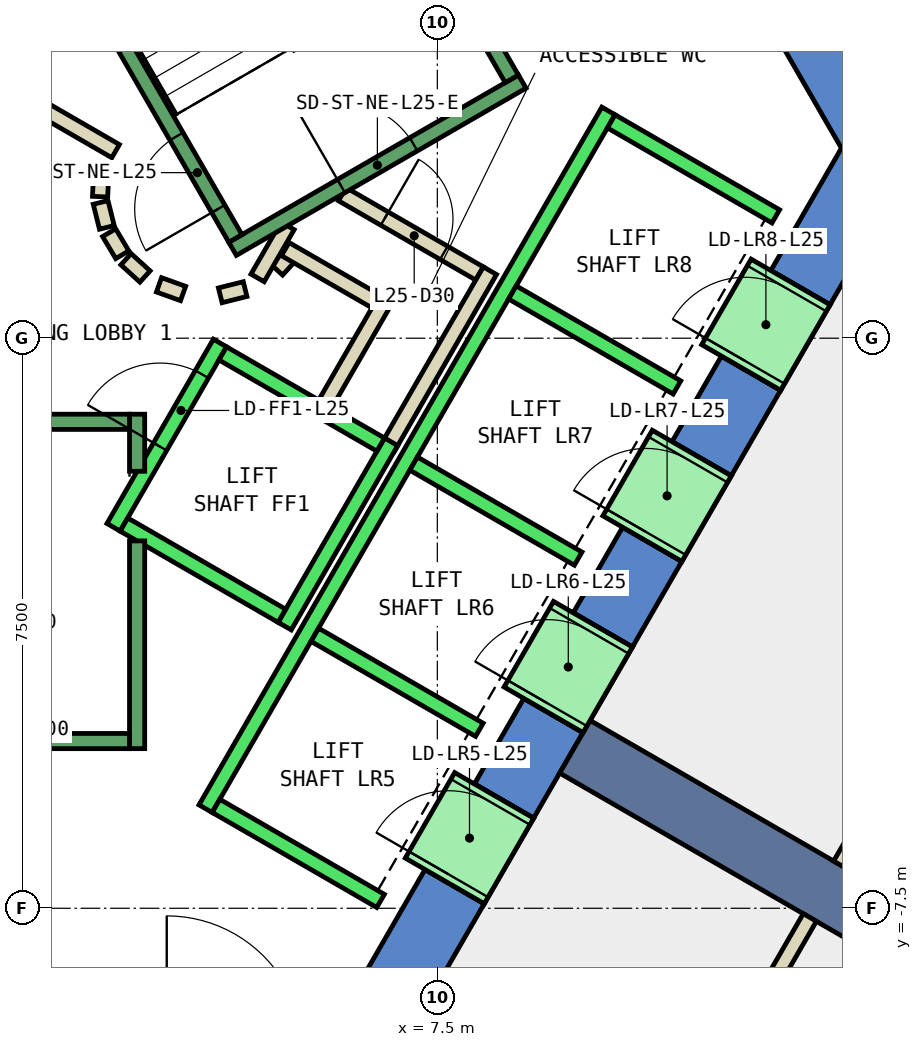
"""IFC4 building model, lengths in metres.
Left out: names, types, materials, properties, quantities, classifications, styles, units other than length and angle.
Written with IfcOpenShell. Run it as: python <this file> out.ifc"""

import sys

from ifc_helpers import new_model, si_unit, direction, frame, frame_2d, origin, place, context, subcontext, project, spatial, polyline, rectangle, outline, extrude, element, fill, save


model = new_model("IFC4")
c1 = context("Model", 3, precision=1e-05, world=origin(), true_north=direction((0.0, 1.0)))
c2 = subcontext(c1, "Body", "Model", "MODEL_VIEW")
j1 = project(units=[si_unit("LENGTHUNIT", "METRE"), si_unit("PLANEANGLEUNIT", "RADIAN")], contexts=[c1])
p1 = place(None, origin())
s1 = spatial("IfcSite", under=j1, at=p1, CompositionType="ELEMENT")
p2 = place(p1, origin())
s2 = spatial("IfcBuilding", under=s1, at=p2, CompositionType="ELEMENT")
p3 = place(p2, frame((0.0, 0.0, 116.0)))
s3 = spatial("IfcBuildingStorey", under=s2, at=p3, CompositionType="ELEMENT", Elevation=116.0)
p4 = place(p3, frame((0.0, 0.0, -0.4)))
e1 = element("IfcWall", 1, at=p4, inside=s3, PredefinedType="SHEAR", context=c2, shape_type="SweptSolid", body=[
    extrude(outline(polyline([(8.517, 11.748), (7.738, 11.298), (12.817, 2.5), (13.856, 2.5), (8.517, 11.748)])), origin(), (0.0, 0.0, 1.0), 4.2),
])
p5 = place(p3, frame((0.0, 0.0, -0.4)))
e2 = element("IfcWall", 2, at=p5, inside=s3, PredefinedType="SHEAR", context=c2, shape_type="SweptSolid", body=[
    extrude(outline(polyline([(8.117, -7.44), (7.338, -6.99), (6.409, -8.6), (6.928, -9.5), (8.117, -7.44)])), origin(), (0.0, 0.0, 1.0), 4.2),
])
p6 = place(p3, frame((0.0, 0.0, -0.4)))
e3 = element("IfcWall", 3, at=p6, inside=s3, PredefinedType="SHEAR", context=c2, shape_type="SweptSolid", body=[
    extrude(outline(polyline([(9.417, -5.189), (8.638, -4.739), (7.988, -5.864), (8.767, -6.314), (9.417, -5.189)])), origin(), (0.0, 0.0, 1.0), 4.2),
])
p7 = place(p3, frame((0.0, 0.0, -0.4)))
e4 = element("IfcWall", 4, at=p7, inside=s3, PredefinedType="SHEAR", context=c2, shape_type="SweptSolid", body=[
    extrude(outline(polyline([(10.717, -2.937), (9.938, -2.487), (9.288, -3.613), (10.067, -4.063), (10.717, -2.937)])), origin(), (0.0, 0.0, 1.0), 4.2),
])
p8 = place(p3, frame((0.0, 0.0, -0.4)))
e5 = element("IfcWall", 5, at=p8, inside=s3, PredefinedType="SHEAR", context=c2, shape_type="SweptSolid", body=[
    extrude(outline(polyline([(12.017, -0.686), (11.238, -0.236), (10.588, -1.361), (11.367, -1.811), (12.017, -0.686)])), origin(), (0.0, 0.0, 1.0), 4.2),
])
p9 = place(p3, frame((0.0, 0.0, -0.4)))
e6 = element("IfcWall", 6, at=p9, inside=s3, PredefinedType="SHEAR", context=c2, shape_type="SweptSolid", body=[
    extrude(outline(polyline([(11.888, 0.89), (12.667, 0.44), (13.856, 2.5), (12.817, 2.5), (11.888, 0.89)])), origin(), (0.0, 0.0, 1.0), 4.2),
])
p10 = place(p3, frame((0.0, 0.0, 3.6)))
e7 = element("IfcWall", 7, at=p10, inside=s3, PredefinedType="SHEAR", context=c2, shape_type="SweptSolid", body=[
    extrude(outline(polyline([(8.767, -6.314), (7.988, -5.864), (7.338, -6.99), (8.117, -7.44), (8.767, -6.314)])), origin(), (0.0, 0.0, 1.0), 0.2),
])
p11 = place(p3, frame((0.0, 0.0, 3.6)))
e8 = element("IfcWall", 8, at=p11, inside=s3, PredefinedType="SHEAR", context=c2, shape_type="SweptSolid", body=[
    extrude(outline(polyline([(10.067, -4.063), (9.288, -3.613), (8.638, -4.739), (9.417, -5.189), (10.067, -4.063)])), origin(), (0.0, 0.0, 1.0), 0.2),
])
p12 = place(p3, frame((0.0, 0.0, 3.6)))
e9 = element("IfcWall", 9, at=p12, inside=s3, PredefinedType="SHEAR", context=c2, shape_type="SweptSolid", body=[
    extrude(outline(polyline([(11.367, -1.811), (10.588, -1.361), (9.938, -2.487), (10.717, -2.937), (11.367, -1.811)])), origin(), (0.0, 0.0, 1.0), 0.2),
])
p13 = place(p3, frame((0.0, 0.0, 3.6)))
e10 = element("IfcWall", 10, at=p13, inside=s3, PredefinedType="SHEAR", context=c2, shape_type="SweptSolid", body=[
    extrude(outline(polyline([(12.667, 0.44), (11.888, 0.89), (11.238, -0.236), (12.017, -0.686), (12.667, 0.44)])), origin(), (0.0, 0.0, 1.0), 0.2),
])
p14 = place(p3, frame((9.31, -5.375, -0.4), z_axis=(0.0, 0.0, 1.0), x_axis=(0.866017533419, -0.500013631625, 0.0)))
e11 = element("IfcWall", 11, at=p14, inside=s3, PredefinedType="SHEAR", context=c2, shape_type="SweptSolid", body=[
    extrude(rectangle(XDim=9.0, YDim=0.8, at=frame_2d((4.5, 0.0))), origin(), (0.0, 0.0, 1.0), 4.2),
])
p15 = place(p3, frame((5.39, 0.898, 0.0), z_axis=(0.0, 0.0, 1.0), x_axis=(0.673828488714, 0.738887791073, 0.0)))
e12 = element("IfcWall", 12, at=p15, inside=s3, PredefinedType="PARTITIONING", context=c2, shape_type="SweptSolid", body=[
    extrude(rectangle(XDim=0.263, YDim=0.2, at=frame_2d((0.131, 0.0))), origin(), (0.0, 0.0, 1.0), 3.8),
])
p16 = place(p3, frame((5.499, 1.172, 0.0), z_axis=(0.0, 0.0, 1.0), x_axis=(0.866333505267, -0.499465972466, 0.0)))
e13 = element("IfcWall", 13, at=p16, inside=s3, PredefinedType="PARTITIONING", context=c2, shape_type="SweptSolid", body=[
    extrude(rectangle(XDim=1.374, YDim=0.2, at=frame_2d((0.687, 0.0))), origin(), (0.0, 0.0, 1.0), 3.8),
])
p17 = place(p3, frame((6.826, 0.522, 0.0), z_axis=(0.0, 0.0, 1.0), x_axis=(-0.500016722714, -0.866015748706, 0.0)))
e14 = element("IfcWall", 14, at=p17, inside=s3, PredefinedType="PARTITIONING", context=c2, shape_type="SweptSolid", body=[
    extrude(rectangle(XDim=1.7, YDim=0.2, at=frame_2d((0.85, 0.0))), origin(), (0.0, 0.0, 1.0), 3.8),
])
p18 = place(p3, frame((6.25, 1.894, 0.0), z_axis=(0.0, 0.0, 1.0), x_axis=(0.866043184279, -0.499969202016, 0.0)))
e15 = element("IfcWall", 15, at=p18, inside=s3, PredefinedType="PARTITIONING", context=c2, shape_type="SweptSolid", body=[
    extrude(rectangle(XDim=2.084, YDim=0.2, at=frame_2d((1.042, 0.0))), origin(), (0.0, 0.0, 1.0), 3.8),
])
p19 = place(p18, frame((0.642, 0.0, 0.0)))
e16 = element("IfcOpeningElement", 16, at=p19, cuts=e15, PredefinedType="OPENING", context=c2, shape_type="SweptSolid", body=[
    extrude(rectangle(XDim=0.9, YDim=2.1, at=frame_2d((0.45, 1.05))), frame((0.0, 0.11, 0.0), z_axis=(0.0, -1.0, 0.0), x_axis=(1.0, 0.0, 0.0)), (0.0, 0.0, 1.0), 0.22),
])
p20 = place(p3, frame((8.192, 0.888, 0.0), z_axis=(0.0, 0.0, 1.0), x_axis=(-0.499940625693, -0.866059680843, 0.0)))
e17 = element("IfcWall", 17, at=p20, inside=s3, PredefinedType="PARTITIONING", context=c2, shape_type="SweptSolid", body=[
    extrude(rectangle(XDim=2.68, YDim=0.2, at=frame_2d((1.34, 0.0))), origin(), (0.0, 0.0, 1.0), 3.8),
])
p21 = place(p3, frame((5.135, 0.793, 0.0), z_axis=(0.0, 0.0, 1.0), x_axis=(0.499526442893, 0.866298639529, 0.0)))
e18 = element("IfcWall", 18, at=p21, inside=s3, PredefinedType="PARTITIONING", context=c2, shape_type="SweptSolid", body=[
    extrude(rectangle(XDim=0.791, YDim=0.2, at=frame_2d((0.396, 0.0))), origin(), (0.0, 0.0, 1.0), 3.8),
])
p22 = place(p3, frame((2.012, 3.186, 0.0), z_axis=(0.0, 0.0, 1.0), x_axis=(0.865891012941, -0.500232699559, 0.0)))
e19 = element("IfcWall", 19, at=p22, inside=s3, PredefinedType="PARTITIONING", context=c2, shape_type="SweptSolid", body=[
    extrude(rectangle(XDim=1.449, YDim=0.2, at=frame_2d((0.725, 0.0))), origin(), (0.0, 0.0, 1.0), 3.8),
])
p23 = place(p3, frame((3.079, 2.199, 0.0), z_axis=(0.0, 0.0, 1.0), x_axis=(-0.047771483479, -0.998858290933, 0.0)))
e20 = element("IfcWall", 20, at=p23, inside=s3, PredefinedType="PARTITIONING", context=c2, shape_type="SweptSolid", body=[
    extrude(rectangle(XDim=0.337, YDim=0.2, at=frame_2d((0.169, 0.0))), origin(), (0.0, 0.0, 1.0), 3.8),
])
p24 = place(p3, frame((3.07, 1.786, 0.0), z_axis=(0.0, 0.0, 1.0), x_axis=(0.242705583207, -0.970099994784, 0.0)))
e21 = element("IfcWall", 21, at=p24, inside=s3, PredefinedType="PARTITIONING", context=c2, shape_type="SweptSolid", body=[
    extrude(rectangle(XDim=0.338, YDim=0.2, at=frame_2d((0.169, 0.0))), origin(), (0.0, 0.0, 1.0), 3.8),
])
for number, where, z_axis, x_axis in (
    (22, (3.182, 1.388, 0.0), (0.0, 0.0, 1.0), (0.512, -0.859, 0.0)),
    (23, (3.404, 1.039, 0.0), (0.0, 0.0, 1.0), (0.74, -0.672, 0.0)),
):
    element("IfcWall", number, at=place(p3, frame(where, z_axis=z_axis, x_axis=x_axis)), inside=s3, PredefinedType="PARTITIONING", context=c2, shape_type="SweptSolid", body=[
        extrude(rectangle(XDim=0.338, YDim=0.2, at=frame_2d((0.169, 0.0))), origin(), (0.0, 0.0, 1.0), 3.8),
    ])
p25 = place(p3, frame((3.838, 0.702, 0.0), z_axis=(0.0, 0.0, 1.0), x_axis=(0.941035081519, -0.338308993895, 0.0)))
e24 = element("IfcWall", 24, at=p25, inside=s3, PredefinedType="PARTITIONING", context=c2, shape_type="SweptSolid", body=[
    extrude(rectangle(XDim=0.337, YDim=0.2, at=frame_2d((0.168, 0.0))), origin(), (0.0, 0.0, 1.0), 3.8),
])
p26 = place(p3, frame((4.644, 0.564, 0.0), z_axis=(0.0, 0.0, 1.0), x_axis=(0.969929076366, 0.243387729394, 0.0)))
e25 = element("IfcWall", 25, at=p26, inside=s3, PredefinedType="PARTITIONING", context=c2, shape_type="SweptSolid", body=[
    extrude(rectangle(XDim=0.337, YDim=0.2, at=frame_2d((0.168, 0.0))), origin(), (0.0, 0.0, 1.0), 3.8),
])
p27 = place(p3, frame((18.301, 2.598, 0.0), z_axis=(0.0, 0.0, 1.0), x_axis=(-0.49997732567, -0.866038494419, 0.0)))
e26 = element("IfcWall", 26, at=p27, inside=s3, PredefinedType="PARTITIONING", context=c2, shape_type="SweptSolid", body=[
    extrude(rectangle(XDim=11.0, YDim=0.2, at=frame_2d((5.5, 0.0))), origin(), (0.0, 0.0, 1.0), 3.8),
])
p28 = place(p3, frame((12.401, -7.621, 0.0), z_axis=(0.0, 0.0, 1.0), x_axis=(-0.499983724212, -0.866034800411, 0.0)))
e27 = element("IfcWall", 27, at=p28, inside=s3, PredefinedType="PARTITIONING", context=c2, shape_type="SweptSolid", body=[
    extrude(rectangle(XDim=9.302, YDim=0.2, at=frame_2d((4.651, 0.0))), origin(), (0.0, 0.0, 1.0), 3.8),
])
p29 = place(p3, frame((3.24, -2.488, 0.0), z_axis=(0.0, 0.0, 1.0), x_axis=(0.49994636267, 0.866056369097, 0.0)))
e28 = element("IfcWall", 28, at=p29, inside=s3, PredefinedType="STANDARD", context=c2, shape_type="SweptSolid", body=[
    extrude(rectangle(XDim=2.8, YDim=0.2, at=frame_2d((1.4, 0.0))), origin(), (0.0, 0.0, 1.0), 3.8),
])
p30 = place(p29, frame((1.225, 0.0, 0.0)))
e29 = element("IfcOpeningElement", 29, at=p30, cuts=e28, PredefinedType="OPENING", context=c2, shape_type="SweptSolid", body=[
    extrude(rectangle(XDim=1.1, YDim=2.1, at=frame_2d((0.55, 1.05))), frame((0.0, 0.11, 0.0), z_axis=(0.0, -1.0, 0.0), x_axis=(1.0, 0.0, 0.0)), (0.0, 0.0, 1.0), 0.22),
])
p31 = place(p3, frame((5.492, -3.788, 0.0), z_axis=(0.0, 0.0, 1.0), x_axis=(0.500011755427, 0.866018616679, 0.0)))
e30 = element("IfcWall", 30, at=p31, inside=s3, PredefinedType="STANDARD", context=c2, shape_type="SweptSolid", body=[
    extrude(rectangle(XDim=2.8, YDim=0.2, at=frame_2d((1.4, 0.0))), origin(), (0.0, 0.0, 1.0), 3.8),
])
p32 = place(p3, frame((3.377, -2.452, 0.0), z_axis=(0.0, 0.0, 1.0), x_axis=(0.865955154139, -0.50012165622, 0.0)))
e31 = element("IfcWall", 31, at=p32, inside=s3, PredefinedType="STANDARD", context=c2, shape_type="SweptSolid", body=[
    extrude(rectangle(XDim=2.4, YDim=0.2, at=frame_2d((1.2, 0.0))), origin(), (0.0, 0.0, 1.0), 3.8),
])
p33 = place(p3, frame((4.677, -0.2, 0.0), z_axis=(0.0, 0.0, 1.0), x_axis=(0.865973769406, -0.500089422704, 0.0)))
e32 = element("IfcWall", 32, at=p33, inside=s3, PredefinedType="STANDARD", context=c2, shape_type="SweptSolid", body=[
    extrude(rectangle(XDim=2.399, YDim=0.2, at=frame_2d((1.2, 0.0))), origin(), (0.0, 0.0, 1.0), 3.8),
])
p34 = place(p3, frame((4.451, -6.19, 0.0), z_axis=(0.0, 0.0, 1.0), x_axis=(0.50000090737, 0.866024879913, 0.0)))
e33 = element("IfcWall", 33, at=p34, inside=s3, PredefinedType="STANDARD", context=c2, shape_type="SweptSolid", body=[
    extrude(rectangle(XDim=10.6, YDim=0.2, at=frame_2d((5.3, 0.0))), origin(), (0.0, 0.0, 1.0), 3.8),
])
for number, where, z_axis, x_axis in (
    (34, (4.588, -6.153, 0.0), (0.0, 0.0, 1.0), (0.866, -0.5, 0.0)),
    (35, (5.888, -3.902, 0.0), (0.0, 0.0, 1.0), (0.866, -0.5, 0.0)),
    (36, (7.188, -1.65, 0.0), (0.0, 0.0, 1.0), (0.866, -0.5, 0.0)),
    (37, (8.488, 0.602, 0.0), (0.0, 0.0, 1.0), (0.866, -0.5, 0.0)),
):
    element("IfcWall", number, at=place(p3, frame(where, z_axis=z_axis, x_axis=x_axis)), inside=s3, PredefinedType="STANDARD", context=c2, shape_type="SweptSolid", body=[
        extrude(rectangle(XDim=2.5, YDim=0.2, at=frame_2d((1.25, 0.0))), origin(), (0.0, 0.0, 1.0), 3.8),
    ])
p35 = place(p3, frame((9.788, 2.853, 0.0), z_axis=(0.0, 0.0, 1.0), x_axis=(0.865998541277, -0.500046524342, 0.0)))
e38 = element("IfcWall", 38, at=p35, inside=s3, PredefinedType="STANDARD", context=c2, shape_type="SweptSolid", body=[
    extrude(rectangle(XDim=2.5, YDim=0.2, at=frame_2d((1.25, 0.0))), origin(), (0.0, 0.0, 1.0), 3.8),
])
p36 = place(p3, frame((7.598, -7.14, 0.0), z_axis=(0.0, 0.0, 1.0), x_axis=(0.500362116554, 0.865816234728, 0.0)))
e39 = element("IfcWall", 39, at=p36, inside=s3, PredefinedType="STANDARD", context=c2, shape_type="SweptSolid", body=[
    extrude(rectangle(XDim=1.299, YDim=1.2, at=frame_2d((0.65, 0.0))), origin(), (0.0, 0.0, 1.0), 2.4),
])
p37 = place(p36, frame((0.1, 0.0, 0.0)))
e40 = element("IfcOpeningElement", 40, at=p37, cuts=e39, PredefinedType="OPENING", context=c2, shape_type="SweptSolid", body=[
    extrude(rectangle(XDim=1.1, YDim=2.3, at=frame_2d((0.55, 1.15))), frame((0.0, 0.61, 0.0), z_axis=(0.0, -1.0, 0.0), x_axis=(1.0, 0.0, 0.0)), (0.0, 0.0, 1.0), 1.22),
])
p38 = place(p3, frame((8.898, -4.889, 0.0), z_axis=(0.0, 0.0, 1.0), x_axis=(0.500036693733, 0.866004217611, 0.0)))
e41 = element("IfcWall", 41, at=p38, inside=s3, PredefinedType="STANDARD", context=c2, shape_type="SweptSolid", body=[
    extrude(rectangle(XDim=1.3, YDim=1.2, at=frame_2d((0.65, 0.0))), origin(), (0.0, 0.0, 1.0), 2.4),
])
p39 = place(p38, frame((0.1, 0.0, 0.0)))
e42 = element("IfcOpeningElement", 42, at=p39, cuts=e41, PredefinedType="OPENING", context=c2, shape_type="SweptSolid", body=[
    extrude(rectangle(XDim=1.1, YDim=2.3, at=frame_2d((0.55, 1.15))), frame((0.0, 0.61, 0.0), z_axis=(0.0, -1.0, 0.0), x_axis=(1.0, 0.0, 0.0)), (0.0, 0.0, 1.0), 1.22),
])
p40 = place(p3, frame((10.198, -2.637, 0.0), z_axis=(0.0, 0.0, 1.0), x_axis=(0.49989585183, 0.866085525409, 0.0)))
e43 = element("IfcWall", 43, at=p40, inside=s3, PredefinedType="STANDARD", context=c2, shape_type="SweptSolid", body=[
    extrude(rectangle(XDim=1.3, YDim=1.2, at=frame_2d((0.65, 0.0))), origin(), (0.0, 0.0, 1.0), 2.4),
])
p41 = place(p40, frame((0.1, 0.0, 0.0)))
e44 = element("IfcOpeningElement", 44, at=p41, cuts=e43, PredefinedType="OPENING", context=c2, shape_type="SweptSolid", body=[
    extrude(rectangle(XDim=1.1, YDim=2.3, at=frame_2d((0.55, 1.15))), frame((0.0, 0.61, 0.0), z_axis=(0.0, -1.0, 0.0), x_axis=(1.0, 0.0, 0.0)), (0.0, 0.0, 1.0), 1.22),
])
p42 = place(p3, frame((11.498, -0.385, 0.0), z_axis=(0.0, 0.0, 1.0), x_axis=(0.500221244143, 0.865897630733, 0.0)))
e45 = element("IfcWall", 45, at=p42, inside=s3, PredefinedType="STANDARD", context=c2, shape_type="SweptSolid", body=[
    extrude(rectangle(XDim=1.299, YDim=1.2, at=frame_2d((0.65, 0.0))), origin(), (0.0, 0.0, 1.0), 2.4),
])
p43 = place(p42, frame((0.1, 0.0, 0.0)))
e46 = element("IfcOpeningElement", 46, at=p43, cuts=e45, PredefinedType="OPENING", context=c2, shape_type="SweptSolid", body=[
    extrude(rectangle(XDim=1.1, YDim=2.3, at=frame_2d((0.55, 1.15))), frame((0.0, 0.61, 0.0), z_axis=(0.0, -1.0, 0.0), x_axis=(1.0, 0.0, 0.0)), (0.0, 0.0, 1.0), 1.22),
])
p44 = place(p3, frame((3.55, -2.667, 0.0), z_axis=(0.0, 0.0, 1.0), x_axis=(0.0, -1.0, 0.0)))
e47 = element("IfcWall", 47, at=p44, inside=s3, PredefinedType="STANDARD", context=c2, shape_type="SweptSolid", body=[
    extrude(rectangle(XDim=2.733, YDim=0.2, at=frame_2d((1.366, 0.0))), origin(), (0.0, 0.0, 1.0), 3.8),
])
p45 = place(p3, frame((3.55, -1.0, 0.0), z_axis=(0.0, 0.0, 1.0), x_axis=(0.0, -1.0, 0.0)))
e48 = element("IfcWall", 48, at=p45, inside=s3, PredefinedType="STANDARD", context=c2, shape_type="SweptSolid", body=[
    extrude(rectangle(XDim=0.751, YDim=0.2, at=frame_2d((0.375, 0.0))), origin(), (0.0, 0.0, 1.0), 3.8),
])
p46 = place(p3, frame((-3.45, -1.1, 0.0), z_axis=(0.0, 0.0, 1.0), x_axis=(1.0, 0.0, 0.0)))
e49 = element("IfcWall", 49, at=p46, inside=s3, PredefinedType="STANDARD", context=c2, shape_type="SweptSolid", body=[
    extrude(rectangle(XDim=6.9, YDim=0.2, at=frame_2d((3.45, 0.0))), origin(), (0.0, 0.0, 1.0), 3.8),
])
p47 = place(p46, frame((0.45, 0.0, 0.0)))
e50 = element("IfcOpeningElement", 50, at=p47, cuts=e49, PredefinedType="OPENING", context=c2, shape_type="SweptSolid", body=[
    extrude(rectangle(XDim=1.1, YDim=2.2, at=frame_2d((0.55, 1.1))), frame((0.0, 0.11, 0.0), z_axis=(0.0, -1.0, 0.0), x_axis=(1.0, 0.0, 0.0)), (0.0, 0.0, 1.0), 0.22),
])
p48 = place(p3, frame((-3.45, -5.3, 0.0), z_axis=(0.0, 0.0, 1.0), x_axis=(1.0, 0.0, 0.0)))
e51 = element("IfcWall", 51, at=p48, inside=s3, PredefinedType="STANDARD", context=c2, shape_type="SweptSolid", body=[
    extrude(rectangle(XDim=6.9, YDim=0.2, at=frame_2d((3.45, 0.0))), origin(), (0.0, 0.0, 1.0), 3.8),
])
p49 = place(p3, frame((4.806, 1.176, 0.0), z_axis=(0.0, 0.0, 1.0), x_axis=(0.866059941101, 0.499940174841, 0.0)))
e52 = element("IfcWall", 52, at=p49, inside=s3, PredefinedType="STANDARD", context=c2, shape_type="SweptSolid", body=[
    extrude(rectangle(XDim=4.4, YDim=0.2, at=frame_2d((2.2, 0.0))), origin(), (0.0, 0.0, 1.0), 3.8),
])
p50 = place(p49, frame((1.65, 0.0, 0.0)))
e53 = element("IfcOpeningElement", 53, at=p50, cuts=e52, PredefinedType="OPENING", context=c2, shape_type="SweptSolid", body=[
    extrude(rectangle(XDim=1.1, YDim=2.2, at=frame_2d((0.55, 1.1))), frame((0.0, 0.11, 0.0), z_axis=(0.0, -1.0, 0.0), x_axis=(1.0, 0.0, 0.0)), (0.0, 0.0, 1.0), 0.22),
])
p51 = place(p3, frame((4.843, 1.312, 0.0), z_axis=(0.0, 0.0, 1.0), x_axis=(-0.499963383562, 0.866046543262, 0.0)))
e54 = element("IfcWall", 54, at=p51, inside=s3, PredefinedType="STANDARD", context=c2, shape_type="SweptSolid", body=[
    extrude(rectangle(XDim=6.9, YDim=0.2, at=frame_2d((3.45, 0.0))), origin(), (0.0, 0.0, 1.0), 3.8),
])
p52 = place(p51, frame((0.45, 0.0, 0.0)))
e55 = element("IfcOpeningElement", 55, at=p52, cuts=e54, PredefinedType="OPENING", context=c2, shape_type="SweptSolid", body=[
    extrude(rectangle(XDim=1.1, YDim=2.2, at=frame_2d((0.55, 1.1))), frame((0.0, 0.11, 0.0), z_axis=(0.0, -1.0, 0.0), x_axis=(1.0, 0.0, 0.0)), (0.0, 0.0, 1.0), 0.22),
])
p53 = place(p3, frame((8.48, 3.412, 0.0), z_axis=(0.0, 0.0, 1.0), x_axis=(-0.499978703459, 0.866037698999, 0.0)))
e56 = element("IfcWall", 56, at=p53, inside=s3, PredefinedType="STANDARD", context=c2, shape_type="SweptSolid", body=[
    extrude(rectangle(XDim=6.9, YDim=0.2, at=frame_2d((3.45, 0.0))), origin(), (0.0, 0.0, 1.0), 3.8),
])
p54 = place(p19, origin())
e57 = element("IfcDoor", 57, at=p54, inside=s3, OperationType="SINGLE_SWING_LEFT", PredefinedType="DOOR", context=c2, shape_type="SweptSolid", body=[
    extrude(rectangle(XDim=0.9, YDim=2.1, at=frame_2d((0.45, 1.05))), frame((0.0, 0.025, 0.0), z_axis=(0.0, -1.0, 0.0), x_axis=(1.0, 0.0, 0.0)), (0.0, 0.0, 1.0), 0.05),
])
fill(e16, e57)
p55 = place(p37, origin())
e58 = element("IfcDoor", 58, at=p55, inside=s3, OperationType="SLIDING_TO_LEFT", PredefinedType="DOOR", context=c2, shape_type="SweptSolid", body=[
    extrude(rectangle(XDim=1.1, YDim=2.3, at=frame_2d((0.55, 1.15))), frame((0.0, 0.025, 0.0), z_axis=(0.0, -1.0, 0.0), x_axis=(1.0, 0.0, 0.0)), (0.0, 0.0, 1.0), 0.05),
])
fill(e40, e58)
p56 = place(p39, origin())
e59 = element("IfcDoor", 59, at=p56, inside=s3, OperationType="SLIDING_TO_LEFT", PredefinedType="DOOR", context=c2, shape_type="SweptSolid", body=[
    extrude(rectangle(XDim=1.1, YDim=2.3, at=frame_2d((0.55, 1.15))), frame((0.0, 0.025, 0.0), z_axis=(0.0, -1.0, 0.0), x_axis=(1.0, 0.0, 0.0)), (0.0, 0.0, 1.0), 0.05),
])
fill(e42, e59)
p57 = place(p41, origin())
e60 = element("IfcDoor", 60, at=p57, inside=s3, OperationType="SLIDING_TO_LEFT", PredefinedType="DOOR", context=c2, shape_type="SweptSolid", body=[
    extrude(rectangle(XDim=1.1, YDim=2.3, at=frame_2d((0.55, 1.15))), frame((0.0, 0.025, 0.0), z_axis=(0.0, -1.0, 0.0), x_axis=(1.0, 0.0, 0.0)), (0.0, 0.0, 1.0), 0.05),
])
fill(e44, e60)
p58 = place(p43, origin())
e61 = element("IfcDoor", 61, at=p58, inside=s3, OperationType="SLIDING_TO_LEFT", PredefinedType="DOOR", context=c2, shape_type="SweptSolid", body=[
    extrude(rectangle(XDim=1.1, YDim=2.3, at=frame_2d((0.55, 1.15))), frame((0.0, 0.025, 0.0), z_axis=(0.0, -1.0, 0.0), x_axis=(1.0, 0.0, 0.0)), (0.0, 0.0, 1.0), 0.05),
])
fill(e46, e61)
p59 = place(p30, origin())
e62 = element("IfcDoor", 62, at=p59, inside=s3, OperationType="SLIDING_TO_LEFT", PredefinedType="DOOR", context=c2, shape_type="SweptSolid", body=[
    extrude(rectangle(XDim=1.1, YDim=2.1, at=frame_2d((0.55, 1.05))), frame((0.0, 0.025, 0.0), z_axis=(0.0, -1.0, 0.0), x_axis=(1.0, 0.0, 0.0)), (0.0, 0.0, 1.0), 0.05),
])
fill(e29, e62)
p60 = place(p52, origin())
e63 = element("IfcDoor", 63, at=p60, inside=s3, OperationType="SINGLE_SWING_LEFT", PredefinedType="DOOR", context=c2, shape_type="SweptSolid", body=[
    extrude(rectangle(XDim=1.1, YDim=2.2, at=frame_2d((0.55, 1.1))), frame((0.0, 0.025, 0.0), z_axis=(0.0, -1.0, 0.0), x_axis=(1.0, 0.0, 0.0)), (0.0, 0.0, 1.0), 0.05),
])
fill(e55, e63)
p61 = place(p50, origin())
e64 = element("IfcDoor", 64, at=p61, inside=s3, OperationType="SINGLE_SWING_LEFT", PredefinedType="DOOR", context=c2, shape_type="SweptSolid", body=[
    extrude(rectangle(XDim=1.1, YDim=2.2, at=frame_2d((0.55, 1.1))), frame((0.0, 0.025, 0.0), z_axis=(0.0, -1.0, 0.0), x_axis=(1.0, 0.0, 0.0)), (0.0, 0.0, 1.0), 0.05),
])
fill(e53, e64)
save(model, sys.argv[1])
